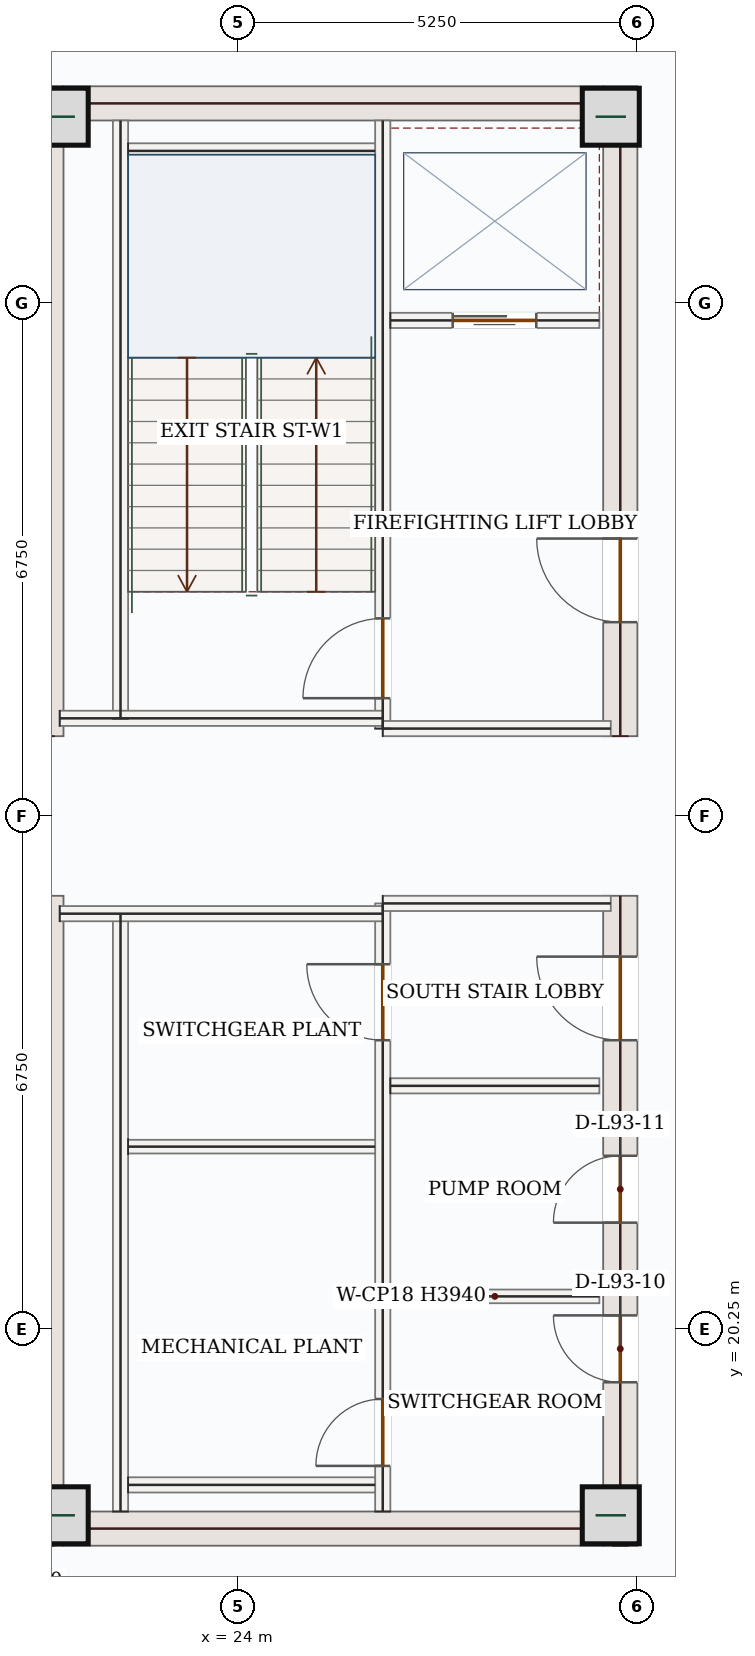
"""IFC4 building model, lengths in metres.
Left out: names, types, materials, properties, quantities, classifications, styles, units other than length and angle.
Written with IfcOpenShell. Run it as: python <this file> out.ifc"""

import sys

from ifc_helpers import new_model, si_unit, direction, frame, frame_2d, origin, origin_2d, place, context, subcontext, project, spatial, rectangle, extrude, source, transform, mapped, element, fill, save


model = new_model("IFC4")
c1 = context("Model", 3, precision=1e-05, world=origin(), true_north=direction((0.0, 1.0)))
c2 = subcontext(c1, "Body", "Model", "MODEL_VIEW")
j1 = project(units=[si_unit("LENGTHUNIT", "METRE"), si_unit("PLANEANGLEUNIT", "RADIAN")], contexts=[c1])
p1 = place(None, origin())
s1 = spatial("IfcSite", under=j1, at=p1, CompositionType="ELEMENT")
p2 = place(p1, origin())
s2 = spatial("IfcBuilding", under=s1, at=p2, CompositionType="ELEMENT")
p3 = place(p2, frame((0.0, 0.0, 383.85)))
s3 = spatial("IfcBuildingStorey", under=s2, at=p3, CompositionType="ELEMENT", Elevation=383.85)
m1 = source(origin(), c2, "Body", "SweptSolid", [
    extrude(rectangle(XDim=8.55, YDim=0.45, at=frame_2d((4.275, 0.0))), origin(), (0.0, 0.0, 1.0), 3.94),
])
for number, where, z_axis, x_axis in (
    (1, (21.475, 17.4, 0.0), (0.0, 0.0, 1.0), (0.0, 1.0, 0.0)),
    (2, (21.475, 28.05, 0.0), (0.0, 0.0, 1.0), (0.0, 1.0, 0.0)),
):
    element("IfcWall", number, at=place(p3, frame(where, z_axis=z_axis, x_axis=x_axis)), inside=s3, PredefinedType="SHEAR", context=c2, shape_type="MappedRepresentation", body=[
        mapped(m1, transform((0.0, 0.0, 0.0), x_axis=(1.0, 0.0, 0.0), y_axis=(0.0, 1.0, 0.0), z_axis=(0.0, 0.0, 1.0), scale=1.0)),
    ])
p4 = place(p3, frame((29.025, 17.4, 0.0), z_axis=(0.0, 0.0, 1.0), x_axis=(0.0, 1.0, 0.0)))
e3 = element("IfcWall", 3, at=p4, inside=s3, PredefinedType="SHEAR", context=c2, shape_type="SweptSolid", body=[
    extrude(rectangle(XDim=8.55, YDim=0.45, at=frame_2d((4.275, 0.0))), origin(), (0.0, 0.0, 1.0), 3.94),
])
p5 = place(p4, frame((6.65, 0.0, 0.0)))
e4 = element("IfcOpeningElement", 4, at=p5, cuts=e3, PredefinedType="OPENING", context=c2, shape_type="SweptSolid", body=[
    extrude(rectangle(XDim=1.1, YDim=2.2, at=frame_2d((0.55, 1.1))), frame((0.0, 0.235, 0.0), z_axis=(0.0, -1.0, 0.0), x_axis=(1.0, 0.0, 0.0)), (0.0, 0.0, 1.0), 0.47),
])
p6 = place(p4, frame((2.15, 0.0, 0.0)))
e5 = element("IfcOpeningElement", 5, at=p6, cuts=e3, PredefinedType="OPENING", context=c2, shape_type="SweptSolid", body=[
    extrude(rectangle(XDim=0.88, YDim=2.1, at=frame_2d((0.44, 1.05))), frame((0.0, 0.235, 0.0), z_axis=(0.0, -1.0, 0.0), x_axis=(1.0, 0.0, 0.0)), (0.0, 0.0, 1.0), 0.47),
])
p7 = place(p4, frame((4.25, 0.0, 0.0)))
e6 = element("IfcOpeningElement", 6, at=p7, cuts=e3, PredefinedType="OPENING", context=c2, shape_type="SweptSolid", body=[
    extrude(rectangle(XDim=0.88, YDim=2.1, at=frame_2d((0.44, 1.05))), frame((0.0, 0.235, 0.0), z_axis=(0.0, -1.0, 0.0), x_axis=(1.0, 0.0, 0.0)), (0.0, 0.0, 1.0), 0.47),
])
p8 = place(p3, frame((29.025, 28.05, 0.0), z_axis=(0.0, 0.0, 1.0), x_axis=(0.0, 1.0, 0.0)))
e7 = element("IfcWall", 7, at=p8, inside=s3, PredefinedType="SHEAR", context=c2, shape_type="SweptSolid", body=[
    extrude(rectangle(XDim=8.55, YDim=0.45, at=frame_2d((4.275, 0.0))), origin(), (0.0, 0.0, 1.0), 3.94),
])
p9 = place(p8, frame((1.5, 0.0, 0.0)))
e8 = element("IfcOpeningElement", 8, at=p9, cuts=e7, PredefinedType="OPENING", context=c2, shape_type="SweptSolid", body=[
    extrude(rectangle(XDim=1.1, YDim=2.2, at=frame_2d((0.55, 1.1))), frame((0.0, 0.235, 0.0), z_axis=(0.0, -1.0, 0.0), x_axis=(1.0, 0.0, 0.0)), (0.0, 0.0, 1.0), 0.47),
])
m2 = source(origin(), c2, "Body", "SweptSolid", [
    extrude(rectangle(XDim=7.1, YDim=0.45, at=frame_2d((3.55, 0.0))), origin(), (0.0, 0.0, 1.0), 3.94),
])
for number, where, z_axis, x_axis in (
    (9, (21.7, 17.625, 0.0), (0.0, 0.0, 1.0), (1.0, 0.0, 0.0)),
    (10, (21.7, 36.375, 0.0), (0.0, 0.0, 1.0), (1.0, 0.0, 0.0)),
):
    element("IfcWall", number, at=place(p3, frame(where, z_axis=z_axis, x_axis=x_axis)), inside=s3, PredefinedType="SHEAR", context=c2, shape_type="MappedRepresentation", body=[
        mapped(m2, transform((0.0, 0.0, 0.0), x_axis=(1.0, 0.0, 0.0), y_axis=(0.0, 1.0, 0.0), z_axis=(0.0, 0.0, 1.0), scale=1.0)),
    ])
m3 = source(origin(), c2, "Body", "SweptSolid", [
    extrude(rectangle(XDim=0.75, YDim=0.75, at=origin_2d()), origin(), (0.0, 0.0, 1.0), 4.2),
])
for number, where, z_axis, x_axis in (
    (11, (21.65, 17.8, 0.0), (0.0, 0.0, 1.0), (1.0, 0.0, 0.0)),
    (12, (28.9, 17.8, 0.0), (0.0, 0.0, 1.0), (1.0, 0.0, 0.0)),
    (13, (21.65, 36.2, 0.0), (0.0, 0.0, 1.0), (1.0, 0.0, 0.0)),
    (14, (28.9, 36.2, 0.0), (0.0, 0.0, 1.0), (1.0, 0.0, 0.0)),
):
    element("IfcColumn", number, at=place(p3, frame(where, z_axis=z_axis, x_axis=x_axis)), inside=s3, PredefinedType="COLUMN", context=c2, shape_type="MappedRepresentation", body=[
        mapped(m3, transform((0.0, 0.0, 0.0), x_axis=(1.0, 0.0, 0.0), y_axis=(0.0, 1.0, 0.0), z_axis=(0.0, 0.0, 1.0), scale=1.0)),
    ])
m4 = source(origin(), c2, "Body", "SweptSolid", [
    extrude(rectangle(XDim=5.258, YDim=0.26, at=frame_2d((2.629, 0.0))), origin(), (0.0, 0.0, 1.0), 3.94),
])
for number, where, z_axis, x_axis in (
    (15, (22.658, 14.74, 0.0), (0.0, 0.0, 1.0), (-0.707, 0.707, 0.0)),
    (16, (18.94, 35.542, 0.0), (0.0, 0.0, 1.0), (0.707, 0.707, 0.0)),
):
    element("IfcWall", number, at=place(p3, frame(where, z_axis=z_axis, x_axis=x_axis)), inside=s3, PredefinedType="SOLIDWALL", context=c2, shape_type="MappedRepresentation", body=[
        mapped(m4, transform((0.0, 0.0, 0.0), x_axis=(1.0, 0.0, 0.0), y_axis=(0.0, 1.0, 0.0), z_axis=(0.0, 0.0, 1.0), scale=1.0)),
    ])
m5 = source(origin(), c2, "Body", "SweptSolid", [
    extrude(rectangle(XDim=7.87, YDim=0.2, at=frame_2d((3.935, 0.0))), origin(), (0.0, 0.0, 1.0), 3.94),
])
for number, where, z_axis, x_axis in (
    (17, (22.45, 17.85, 0.0), (0.0, 0.0, 1.0), (0.0, 1.0, 0.0)),
    (18, (22.45, 28.28, 0.0), (0.0, 0.0, 1.0), (0.0, 1.0, 0.0)),
):
    element("IfcWall", number, at=place(p3, frame(where, z_axis=z_axis, x_axis=x_axis)), inside=s3, PredefinedType="SOLIDWALL", context=c2, shape_type="MappedRepresentation", body=[
        mapped(m5, transform((0.0, 0.0, 0.0), x_axis=(1.0, 0.0, 0.0), y_axis=(0.0, 1.0, 0.0), z_axis=(0.0, 0.0, 1.0), scale=1.0)),
    ])
p10 = place(p3, frame((25.9, 17.85, 0.0), z_axis=(0.0, 0.0, 1.0), x_axis=(0.0, 1.0, 0.0)))
e19 = element("IfcWall", 19, at=p10, inside=s3, PredefinedType="SOLIDWALL", context=c2, shape_type="SweptSolid", body=[
    extrude(rectangle(XDim=8.0, YDim=0.2, at=frame_2d((4.0, 0.0))), origin(), (0.0, 0.0, 1.0), 3.94),
])
p11 = place(p10, frame((6.2, 0.0, 0.0)))
e20 = element("IfcOpeningElement", 20, at=p11, cuts=e19, PredefinedType="OPENING", context=c2, shape_type="SweptSolid", body=[
    extrude(rectangle(XDim=1.0, YDim=2.15, at=frame_2d((0.5, 1.075))), frame((0.0, 0.11, 0.0), z_axis=(0.0, -1.0, 0.0), x_axis=(1.0, 0.0, 0.0)), (0.0, 0.0, 1.0), 0.22),
])
p12 = place(p10, frame((0.6, 0.0, 0.0)))
e21 = element("IfcOpeningElement", 21, at=p12, cuts=e19, PredefinedType="OPENING", context=c2, shape_type="SweptSolid", body=[
    extrude(rectangle(XDim=0.88, YDim=2.1, at=frame_2d((0.44, 1.05))), frame((0.0, 0.11, 0.0), z_axis=(0.0, -1.0, 0.0), x_axis=(1.0, 0.0, 0.0)), (0.0, 0.0, 1.0), 0.22),
])
p13 = place(p3, frame((25.9, 28.15, 0.0), z_axis=(0.0, 0.0, 1.0), x_axis=(0.0, 1.0, 0.0)))
e22 = element("IfcWall", 22, at=p13, inside=s3, PredefinedType="SOLIDWALL", context=c2, shape_type="SweptSolid", body=[
    extrude(rectangle(XDim=8.0, YDim=0.2, at=frame_2d((4.0, 0.0))), origin(), (0.0, 0.0, 1.0), 3.94),
])
p14 = place(p13, frame((0.4, 0.0, 0.0)))
e23 = element("IfcOpeningElement", 23, at=p14, cuts=e22, PredefinedType="OPENING", context=c2, shape_type="SweptSolid", body=[
    extrude(rectangle(XDim=1.05, YDim=2.15, at=frame_2d((0.525, 1.075))), frame((0.0, 0.11, 0.0), z_axis=(0.0, -1.0, 0.0), x_axis=(1.0, 0.0, 0.0)), (0.0, 0.0, 1.0), 0.22),
])
m6 = source(origin(), c2, "Body", "SweptSolid", [
    extrude(rectangle(XDim=4.25, YDim=0.2, at=frame_2d((2.125, 0.0))), origin(), (0.0, 0.0, 1.0), 3.94),
])
p15 = place(p3, frame((21.65, 25.715, 0.0), z_axis=(0.0, 0.0, 1.0), x_axis=(1.0, 0.0, 0.0)))
e24 = element("IfcWall", 24, at=p15, inside=s3, PredefinedType="SOLIDWALL", context=c2, shape_type="MappedRepresentation", body=[
    mapped(m6, transform((0.0, 0.0, 0.0), x_axis=(1.0, 0.0, 0.0), y_axis=(0.0, 1.0, 0.0), z_axis=(0.0, 0.0, 1.0), scale=1.0)),
])
m7 = source(origin(), c2, "Body", "SweptSolid", [
    extrude(rectangle(XDim=3.0, YDim=0.2, at=frame_2d((1.5, 0.0))), origin(), (0.0, 0.0, 1.0), 3.94),
])
p16 = place(p3, frame((25.9, 25.85, 0.0), z_axis=(0.0, 0.0, 1.0), x_axis=(1.0, 0.0, 0.0)))
e25 = element("IfcWall", 25, at=p16, inside=s3, PredefinedType="SOLIDWALL", context=c2, shape_type="MappedRepresentation", body=[
    mapped(m7, transform((0.0, 0.0, 0.0), x_axis=(1.0, 0.0, 0.0), y_axis=(0.0, 1.0, 0.0), z_axis=(0.0, 0.0, 1.0), scale=1.0)),
])
p17 = place(p3, frame((21.65, 28.285, 0.0), z_axis=(0.0, 0.0, 1.0), x_axis=(1.0, 0.0, 0.0)))
e26 = element("IfcWall", 26, at=p17, inside=s3, PredefinedType="SOLIDWALL", context=c2, shape_type="MappedRepresentation", body=[
    mapped(m6, transform((0.0, 0.0, 0.0), x_axis=(1.0, 0.0, 0.0), y_axis=(0.0, 1.0, 0.0), z_axis=(0.0, 0.0, 1.0), scale=1.0)),
])
p18 = place(p3, frame((25.9, 28.15, 0.0), z_axis=(0.0, 0.0, 1.0), x_axis=(1.0, 0.0, 0.0)))
e27 = element("IfcWall", 27, at=p18, inside=s3, PredefinedType="SOLIDWALL", context=c2, shape_type="MappedRepresentation", body=[
    mapped(m7, transform((0.0, 0.0, 0.0), x_axis=(1.0, 0.0, 0.0), y_axis=(0.0, 1.0, 0.0), z_axis=(0.0, 0.0, 1.0), scale=1.0)),
])
m8 = source(origin(), c2, "Body", "SweptSolid", [
    extrude(rectangle(XDim=3.25, YDim=0.2, at=frame_2d((1.625, 0.0))), origin(), (0.0, 0.0, 1.0), 3.94),
])
for number, where, z_axis, x_axis in (
    (28, (22.55, 35.75, 0.0), (0.0, 0.0, 1.0), (1.0, 0.0, 0.0)),
    (29, (22.55, 18.2, 0.0), (0.0, 0.0, 1.0), (1.0, 0.0, 0.0)),
):
    element("IfcWall", number, at=place(p3, frame(where, z_axis=z_axis, x_axis=x_axis)), inside=s3, PredefinedType="SOLIDWALL", context=c2, shape_type="MappedRepresentation", body=[
        mapped(m8, transform((0.0, 0.0, 0.0), x_axis=(1.0, 0.0, 0.0), y_axis=(0.0, 1.0, 0.0), z_axis=(0.0, 0.0, 1.0), scale=1.0)),
    ])
m9 = source(origin(), c2, "Body", "SweptSolid", [
    extrude(rectangle(XDim=3.25, YDim=0.18, at=frame_2d((1.625, 0.0))), origin(), (0.0, 0.0, 1.0), 3.94),
])
p19 = place(p3, frame((22.55, 22.65, 0.0), z_axis=(0.0, 0.0, 1.0), x_axis=(1.0, 0.0, 0.0)))
e30 = element("IfcWall", 30, at=p19, inside=s3, PredefinedType="PARTITIONING", context=c2, shape_type="MappedRepresentation", body=[
    mapped(m9, transform((0.0, 0.0, 0.0), x_axis=(1.0, 0.0, 0.0), y_axis=(0.0, 1.0, 0.0), z_axis=(0.0, 0.0, 1.0), scale=1.0)),
])
p20 = place(p3, frame((26.0, 33.52, 0.0), z_axis=(0.0, 0.0, 1.0), x_axis=(1.0, 0.0, 0.0)))
e31 = element("IfcWall", 31, at=p20, inside=s3, PredefinedType="SOLIDWALL", context=c2, shape_type="SweptSolid", body=[
    extrude(rectangle(XDim=2.75, YDim=0.2, at=frame_2d((1.375, 0.0))), origin(), (0.0, 0.0, 1.0), 3.94),
])
p21 = place(p20, frame((0.82, 0.0, 0.0)))
e32 = element("IfcOpeningElement", 32, at=p21, cuts=e31, PredefinedType="OPENING", context=c2, shape_type="SweptSolid", body=[
    extrude(rectangle(XDim=1.1, YDim=2.15, at=frame_2d((0.55, 1.075))), frame((0.0, 0.11, 0.0), z_axis=(0.0, -1.0, 0.0), x_axis=(1.0, 0.0, 0.0)), (0.0, 0.0, 1.0), 0.22),
])
m10 = source(origin(), c2, "Body", "SweptSolid", [
    extrude(rectangle(XDim=2.75, YDim=0.2, at=frame_2d((1.375, 0.0))), origin(), (0.0, 0.0, 1.0), 3.94),
])
p22 = place(p3, frame((26.0, 23.45, 0.0), z_axis=(0.0, 0.0, 1.0), x_axis=(1.0, 0.0, 0.0)))
e33 = element("IfcWall", 33, at=p22, inside=s3, PredefinedType="SOLIDWALL", context=c2, shape_type="MappedRepresentation", body=[
    mapped(m10, transform((0.0, 0.0, 0.0), x_axis=(1.0, 0.0, 0.0), y_axis=(0.0, 1.0, 0.0), z_axis=(0.0, 0.0, 1.0), scale=1.0)),
])
m11 = source(origin(), c2, "Body", "SweptSolid", [
    extrude(rectangle(XDim=2.75, YDim=0.18, at=frame_2d((1.375, 0.0))), origin(), (0.0, 0.0, 1.0), 3.94),
])
p23 = place(p3, frame((26.0, 20.68, 0.0), z_axis=(0.0, 0.0, 1.0), x_axis=(1.0, 0.0, 0.0)))
e34 = element("IfcWall", 34, at=p23, inside=s3, PredefinedType="PARTITIONING", context=c2, shape_type="MappedRepresentation", body=[
    mapped(m11, transform((0.0, 0.0, 0.0), x_axis=(1.0, 0.0, 0.0), y_axis=(0.0, 1.0, 0.0), z_axis=(0.0, 0.0, 1.0), scale=1.0)),
])
m12 = source(origin(), c2, "Body", "SweptSolid", [
    extrude(rectangle(XDim=1.05, YDim=2.15, at=frame_2d((0.525, 1.075))), frame((0.0, 0.025, 0.0), z_axis=(0.0, -1.0, 0.0), x_axis=(1.0, 0.0, 0.0)), (0.0, 0.0, 1.0), 0.05),
])
p24 = place(p14, origin())
e35 = element("IfcDoor", 35, at=p24, inside=s3, OperationType="SINGLE_SWING_LEFT", PredefinedType="DOOR", context=c2, shape_type="MappedRepresentation", body=[
    mapped(m12, transform((0.0, 0.0, 0.0), x_axis=(1.0, 0.0, 0.0), y_axis=(0.0, 1.0, 0.0), z_axis=(0.0, 0.0, 1.0), scale=1.0)),
])
fill(e23, e35)
m13 = source(origin(), c2, "Body", "SweptSolid", [
    extrude(rectangle(XDim=1.0, YDim=2.15, at=frame_2d((0.5, 1.075))), frame((0.0, 0.025, 0.0), z_axis=(0.0, -1.0, 0.0), x_axis=(1.0, 0.0, 0.0)), (0.0, 0.0, 1.0), 0.05),
])
p25 = place(p11, origin())
e36 = element("IfcDoor", 36, at=p25, inside=s3, OperationType="SINGLE_SWING_RIGHT", PredefinedType="DOOR", context=c2, shape_type="MappedRepresentation", body=[
    mapped(m13, transform((0.0, 0.0, 0.0), x_axis=(1.0, 0.0, 0.0), y_axis=(0.0, 1.0, 0.0), z_axis=(0.0, 0.0, 1.0), scale=1.0)),
])
fill(e20, e36)
m14 = source(origin(), c2, "Body", "SweptSolid", [
    extrude(rectangle(XDim=0.88, YDim=2.1, at=frame_2d((0.44, 1.05))), frame((0.0, 0.025, 0.0), z_axis=(0.0, -1.0, 0.0), x_axis=(1.0, 0.0, 0.0)), (0.0, 0.0, 1.0), 0.05),
])
p26 = place(p12, origin())
e37 = element("IfcDoor", 37, at=p26, inside=s3, OperationType="SINGLE_SWING_LEFT", PredefinedType="DOOR", context=c2, shape_type="MappedRepresentation", body=[
    mapped(m14, transform((0.0, 0.0, 0.0), x_axis=(1.0, 0.0, 0.0), y_axis=(0.0, 1.0, 0.0), z_axis=(0.0, 0.0, 1.0), scale=1.0)),
])
fill(e21, e37)
m15 = source(origin(), c2, "Body", "SweptSolid", [
    extrude(rectangle(XDim=1.1, YDim=2.15, at=frame_2d((0.55, 1.075))), frame((0.0, 0.025, 0.0), z_axis=(0.0, -1.0, 0.0), x_axis=(1.0, 0.0, 0.0)), (0.0, 0.0, 1.0), 0.05),
])
p27 = place(p21, origin())
e38 = element("IfcDoor", 38, at=p27, inside=s3, OperationType="DOUBLE_DOOR_SLIDING", PredefinedType="DOOR", context=c2, shape_type="MappedRepresentation", body=[
    mapped(m15, transform((0.0, 0.0, 0.0), x_axis=(1.0, 0.0, 0.0), y_axis=(0.0, 1.0, 0.0), z_axis=(0.0, 0.0, 1.0), scale=1.0)),
])
fill(e32, e38)
m16 = source(origin(), c2, "Body", "SweptSolid", [
    extrude(rectangle(XDim=1.1, YDim=2.2, at=frame_2d((0.55, 1.1))), frame((0.0, 0.025, 0.0), z_axis=(0.0, -1.0, 0.0), x_axis=(1.0, 0.0, 0.0)), (0.0, 0.0, 1.0), 0.05),
])
p28 = place(p9, origin())
e39 = element("IfcDoor", 39, at=p28, inside=s3, OperationType="SINGLE_SWING_RIGHT", PredefinedType="DOOR", context=c2, shape_type="MappedRepresentation", body=[
    mapped(m16, transform((0.0, 0.0, 0.0), x_axis=(1.0, 0.0, 0.0), y_axis=(0.0, 1.0, 0.0), z_axis=(0.0, 0.0, 1.0), scale=1.0)),
])
fill(e8, e39)
p29 = place(p5, origin())
e40 = element("IfcDoor", 40, at=p29, inside=s3, OperationType="SINGLE_SWING_RIGHT", PredefinedType="DOOR", context=c2, shape_type="MappedRepresentation", body=[
    mapped(m16, transform((0.0, 0.0, 0.0), x_axis=(1.0, 0.0, 0.0), y_axis=(0.0, 1.0, 0.0), z_axis=(0.0, 0.0, 1.0), scale=1.0)),
])
fill(e4, e40)
p30 = place(p6, origin())
e41 = element("IfcDoor", 41, at=p30, inside=s3, OperationType="SINGLE_SWING_RIGHT", PredefinedType="DOOR", context=c2, shape_type="MappedRepresentation", body=[
    mapped(m14, transform((0.0, 0.0, 0.0), x_axis=(1.0, 0.0, 0.0), y_axis=(0.0, 1.0, 0.0), z_axis=(0.0, 0.0, 1.0), scale=1.0)),
])
fill(e5, e41)
p31 = place(p7, origin())
e42 = element("IfcDoor", 42, at=p31, inside=s3, OperationType="SINGLE_SWING_LEFT", PredefinedType="DOOR", context=c2, shape_type="MappedRepresentation", body=[
    mapped(m14, transform((0.0, 0.0, 0.0), x_axis=(1.0, 0.0, 0.0), y_axis=(0.0, 1.0, 0.0), z_axis=(0.0, 0.0, 1.0), scale=1.0)),
])
fill(e6, e42)
save(model, sys.argv[1])
